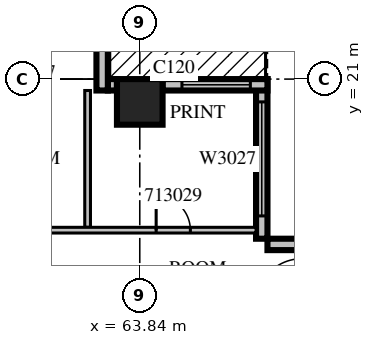
"""IFC4 building model, lengths in metres.
Left out: names, types, materials, properties, quantities, classifications, styles, units other than length and angle.
Written with IfcOpenShell. Run it as: python <this file> out.ifc"""

import sys

from ifc_helpers import new_model, si_unit, direction, frame, frame_2d, origin, origin_2d, place, context, subcontext, project, spatial, rectangle, extrude, source, transform, mapped, element, fill, save


model = new_model("IFC4")
c1 = context("Model", 3, precision=1e-05, world=origin(), true_north=direction((0.0, 1.0)))
c2 = subcontext(c1, "Body", "Model", "MODEL_VIEW")
j1 = project(units=[si_unit("LENGTHUNIT", "METRE"), si_unit("PLANEANGLEUNIT", "RADIAN")], contexts=[c1])
p1 = place(None, origin())
s1 = spatial("IfcSite", under=j1, at=p1, CompositionType="ELEMENT")
p2 = place(p1, origin())
s2 = spatial("IfcBuilding", under=s1, at=p2, CompositionType="ELEMENT")
p3 = place(p2, frame((0.0, 0.0, 65.7)))
s3 = spatial("IfcBuildingStorey", under=s2, at=p3, CompositionType="ELEMENT", Elevation=65.7)
m1 = source(origin(), c2, "Body", "SweptSolid", [
    extrude(rectangle(XDim=1.2, YDim=1.2, at=origin_2d()), origin(), (0.0, 0.0, 1.0), 4.2),
])
p4 = place(p3, frame((63.84, 20.4, 0.0), z_axis=(0.0, 0.0, 1.0), x_axis=(1.0, 0.0, 0.0)))
e1 = element("IfcColumn", 1, at=p4, inside=s3, PredefinedType="COLUMN", context=c2, shape_type="MappedRepresentation", body=[
    mapped(m1, transform((0.0, 0.0, 0.0), scale=1.0)),
])
m2 = source(origin(), c2, "Body", "SweptSolid", [
    extrude(rectangle(XDim=4.2, YDim=0.3, at=frame_2d((2.1, 0.0))), origin(), (0.0, 0.0, 1.0), 3.8),
])
p5 = place(p3, frame((71.4, 16.65, 0.0), z_axis=(0.0, 0.0, 1.0), x_axis=(-1.0, 0.0, 0.0)))
e2 = element("IfcWall", 2, at=p5, inside=s3, PredefinedType="STANDARD", context=c2, shape_type="MappedRepresentation", body=[
    mapped(m2, transform((0.0, 0.0, 0.0), scale=1.0)),
])
m3 = source(origin(), c2, "Body", "SweptSolid", [
    extrude(rectangle(XDim=1.2, YDim=2.7, at=frame_2d((0.6, 1.35))), frame((0.0, 0.16, 0.0), z_axis=(0.0, -1.0, 0.0), x_axis=(1.0, 0.0, 0.0)), (0.0, 0.0, 1.0), 0.32),
])
p6 = place(p5, frame((0.66, 0.0, 0.6)))
e3 = element("IfcOpeningElement", 3, at=p6, cuts=e2, PredefinedType="OPENING", context=c2, shape_type="MappedRepresentation", body=[
    mapped(m3, transform((0.0, 0.0, 0.0), scale=1.0)),
])
p7 = place(p3, frame((67.05, 16.8, 0.0), z_axis=(0.0, 0.0, 1.0), x_axis=(0.0, 1.0, 0.0)))
e4 = element("IfcWall", 4, at=p7, inside=s3, PredefinedType="STANDARD", context=c2, shape_type="MappedRepresentation", body=[
    mapped(m2, transform((0.0, 0.0, 0.0), scale=1.0)),
])
m4 = source(origin(), c2, "Body", "SweptSolid", [
    extrude(rectangle(XDim=3.0, YDim=2.7, at=frame_2d((1.5, 1.35))), frame((0.0, 0.16, 0.0), z_axis=(0.0, -1.0, 0.0), x_axis=(1.0, 0.0, 0.0)), (0.0, 0.0, 1.0), 0.32),
])
p8 = place(p7, frame((0.6, 0.0, 0.6)))
e5 = element("IfcOpeningElement", 5, at=p8, cuts=e4, PredefinedType="OPENING", context=c2, shape_type="MappedRepresentation", body=[
    mapped(m4, transform((0.0, 0.0, 0.0), scale=1.0)),
])
m5 = source(origin(), c2, "Body", "SweptSolid", [
    extrude(rectangle(XDim=2.76, YDim=0.3, at=frame_2d((1.38, 0.0))), origin(), (0.0, 0.0, 1.0), 3.8),
])
p9 = place(p3, frame((67.2, 20.85, 0.0), z_axis=(0.0, 0.0, 1.0), x_axis=(-1.0, 0.0, 0.0)))
e6 = element("IfcWall", 6, at=p9, inside=s3, PredefinedType="STANDARD", context=c2, shape_type="MappedRepresentation", body=[
    mapped(m5, transform((0.0, 0.0, 0.0), scale=1.0)),
])
m6 = source(origin(), c2, "Body", "SweptSolid", [
    extrude(rectangle(XDim=1.8, YDim=2.4, at=frame_2d((0.9, 1.2))), frame((0.0, 0.16, 0.0), z_axis=(0.0, -1.0, 0.0), x_axis=(1.0, 0.0, 0.0)), (0.0, 0.0, 1.0), 0.32),
])
p10 = place(p9, frame((0.45, 0.0, 0.0)))
e7 = element("IfcOpeningElement", 7, at=p10, cuts=e6, PredefinedType="OPENING", context=c2, shape_type="MappedRepresentation", body=[
    mapped(m6, transform((0.0, 0.0, 0.0), scale=1.0)),
])
m7 = source(origin(), c2, "Body", "SweptSolid", [
    extrude(rectangle(XDim=0.24, YDim=0.3, at=frame_2d((0.12, 0.0))), origin(), (0.0, 0.0, 1.0), 3.8),
])
p11 = place(p3, frame((63.24, 20.85, 0.0), z_axis=(0.0, 0.0, 1.0), x_axis=(-1.0, 0.0, 0.0)))
e8 = element("IfcWall", 8, at=p11, inside=s3, PredefinedType="STANDARD", context=c2, shape_type="MappedRepresentation", body=[
    mapped(m7, transform((0.0, 0.0, 0.0), scale=1.0)),
])
m8 = source(origin(), c2, "Body", "SweptSolid", [
    extrude(rectangle(XDim=1.2, YDim=0.3, at=frame_2d((0.6, 0.0))), origin(), (0.0, 0.0, 1.0), 3.8),
])
p12 = place(p3, frame((62.85, 20.7, 0.0), z_axis=(0.0, 0.0, 1.0), x_axis=(0.0, 1.0, 0.0)))
e9 = element("IfcWall", 9, at=p12, inside=s3, PredefinedType="STANDARD", context=c2, shape_type="MappedRepresentation", body=[
    mapped(m8, transform((0.0, 0.0, 0.0), scale=1.0)),
])
m9 = source(origin(), c2, "Body", "SweptSolid", [
    extrude(rectangle(XDim=3.6, YDim=0.15, at=frame_2d((1.8, 0.0))), origin(), (0.0, 0.0, 1.0), 3.8),
])
p13 = place(p3, frame((62.468, 20.7, 0.0), z_axis=(0.0, 0.0, 1.0), x_axis=(0.0, -1.0, 0.0)))
e10 = element("IfcWall", 10, at=p13, inside=s3, PredefinedType="PARTITIONING", context=c2, shape_type="MappedRepresentation", body=[
    mapped(m9, transform((0.0, 0.0, 0.0), scale=1.0)),
])
m10 = source(origin(), c2, "Body", "SweptSolid", [
    extrude(rectangle(XDim=37.5, YDim=0.15, at=frame_2d((18.75, 0.0))), origin(), (0.0, 0.0, 1.0), 3.8),
])
p14 = place(p3, frame((29.4, 17.025, 0.0), z_axis=(0.0, 0.0, 1.0), x_axis=(1.0, 0.0, 0.0)))
e11 = element("IfcWall", 11, at=p14, inside=s3, PredefinedType="PARTITIONING", context=c2, shape_type="MappedRepresentation", body=[
    mapped(m10, transform((0.0, 0.0, 0.0), scale=1.0)),
])
m11 = source(origin(), c2, "Body", "SweptSolid", [
    extrude(rectangle(XDim=1.0, YDim=2.1, at=frame_2d((0.5, 1.05))), frame((0.0, 0.085, 0.0), z_axis=(0.0, -1.0, 0.0), x_axis=(1.0, 0.0, 0.0)), (0.0, 0.0, 1.0), 0.17),
])
p15 = place(p14, frame((1.357, 0.0, 0.0)))
e12 = element("IfcOpeningElement", 12, at=p15, cuts=e11, PredefinedType="OPENING", context=c2, shape_type="MappedRepresentation", body=[
    mapped(m11, transform((0.0, 0.0, 0.0), scale=1.0)),
])
p16 = place(p14, frame((4.669, 0.0, 0.0)))
e13 = element("IfcOpeningElement", 13, at=p16, cuts=e11, PredefinedType="OPENING", context=c2, shape_type="MappedRepresentation", body=[
    mapped(m11, transform((0.0, 0.0, 0.0), scale=1.0)),
])
p17 = place(p14, frame((7.012, 0.0, 0.0)))
e14 = element("IfcOpeningElement", 14, at=p17, cuts=e11, PredefinedType="OPENING", context=c2, shape_type="MappedRepresentation", body=[
    mapped(m11, transform((0.0, 0.0, 0.0), scale=1.0)),
])
m12 = source(origin(), c2, "Body", "SweptSolid", [
    extrude(rectangle(XDim=0.9, YDim=2.1, at=frame_2d((0.45, 1.05))), frame((0.0, 0.085, 0.0), z_axis=(0.0, -1.0, 0.0), x_axis=(1.0, 0.0, 0.0)), (0.0, 0.0, 1.0), 0.17),
])
p18 = place(p14, frame((9.158, 0.0, 0.0)))
e15 = element("IfcOpeningElement", 15, at=p18, cuts=e11, PredefinedType="OPENING", context=c2, shape_type="MappedRepresentation", body=[
    mapped(m12, transform((0.0, 0.0, 0.0), scale=1.0)),
])
p19 = place(p14, frame((11.258, 0.0, 0.0)))
e16 = element("IfcOpeningElement", 16, at=p19, cuts=e11, PredefinedType="OPENING", context=c2, shape_type="MappedRepresentation", body=[
    mapped(m12, transform((0.0, 0.0, 0.0), scale=1.0)),
])
p20 = place(p14, frame((14.822, 0.0, 0.0)))
e17 = element("IfcOpeningElement", 17, at=p20, cuts=e11, PredefinedType="OPENING", context=c2, shape_type="MappedRepresentation", body=[
    mapped(m12, transform((0.0, 0.0, 0.0), scale=1.0)),
])
p21 = place(p14, frame((20.13, 0.0, 0.0)))
e18 = element("IfcOpeningElement", 18, at=p21, cuts=e11, PredefinedType="OPENING", context=c2, shape_type="MappedRepresentation", body=[
    mapped(m12, transform((0.0, 0.0, 0.0), scale=1.0)),
])
p22 = place(p14, frame((25.438, 0.0, 0.0)))
e19 = element("IfcOpeningElement", 19, at=p22, cuts=e11, PredefinedType="OPENING", context=c2, shape_type="MappedRepresentation", body=[
    mapped(m12, transform((0.0, 0.0, 0.0), scale=1.0)),
])
p23 = place(p14, frame((30.364, 0.0, 0.0)))
e20 = element("IfcOpeningElement", 20, at=p23, cuts=e11, PredefinedType="OPENING", context=c2, shape_type="MappedRepresentation", body=[
    mapped(m12, transform((0.0, 0.0, 0.0), scale=1.0)),
])
p24 = place(p14, frame((34.871, 0.0, 0.0)))
e21 = element("IfcOpeningElement", 21, at=p24, cuts=e11, PredefinedType="OPENING", context=c2, shape_type="MappedRepresentation", body=[
    mapped(m12, transform((0.0, 0.0, 0.0), scale=1.0)),
])
m13 = source(origin(), c2, "Body", "SweptSolid", [
    extrude(rectangle(XDim=3.0, YDim=2.7, at=frame_2d((1.5, 1.35))), frame((0.0, 0.03, 0.0), z_axis=(0.0, -1.0, 0.0), x_axis=(1.0, 0.0, 0.0)), (0.0, 0.0, 1.0), 0.06),
])
p25 = place(p8, origin())
e22 = element("IfcWindow", 22, at=p25, inside=s3, PartitioningType="SINGLE_PANEL", PredefinedType="WINDOW", context=c2, shape_type="MappedRepresentation", body=[
    mapped(m13, transform((0.0, 0.0, 0.0), scale=1.0)),
])
fill(e5, e22)
m14 = source(origin(), c2, "Body", "SweptSolid", [
    extrude(rectangle(XDim=1.8, YDim=2.4, at=frame_2d((0.9, 1.2))), frame((0.0, 0.025, 0.0), z_axis=(0.0, -1.0, 0.0), x_axis=(1.0, 0.0, 0.0)), (0.0, 0.0, 1.0), 0.05),
])
p26 = place(p10, origin())
e23 = element("IfcDoor", 23, at=p26, inside=s3, OperationType="SLIDING_TO_LEFT", PredefinedType="DOOR", context=c2, shape_type="MappedRepresentation", body=[
    mapped(m14, transform((0.0, 0.0, 0.0), scale=1.0)),
])
fill(e7, e23)
m15 = source(origin(), c2, "Body", "SweptSolid", [
    extrude(rectangle(XDim=0.9, YDim=2.1, at=frame_2d((0.45, 1.05))), frame((0.0, 0.025, 0.0), z_axis=(0.0, -1.0, 0.0), x_axis=(1.0, 0.0, 0.0)), (0.0, 0.0, 1.0), 0.05),
])
p27 = place(p24, origin())
e24 = element("IfcDoor", 24, at=p27, inside=s3, OperationType="SINGLE_SWING_LEFT", PredefinedType="DOOR", context=c2, shape_type="MappedRepresentation", body=[
    mapped(m15, transform((0.0, 0.0, 0.0), scale=1.0)),
])
fill(e21, e24)
save(model, sys.argv[1])
